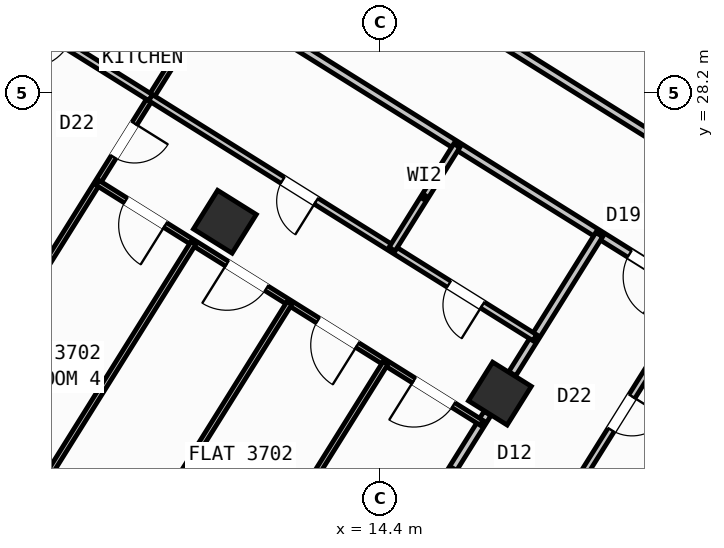
"""IFC4 building model, lengths in metres.
Left out: names, types, materials, properties, quantities, classifications, styles, units other than length and angle.
Written with IfcOpenShell. Run it as: python <this file> out.ifc"""

import sys

from ifc_helpers import new_model, si_unit, direction, frame, frame_2d, origin, origin_2d, place, context, subcontext, project, spatial, rectangle, hollow_rectangle, extrude, source, transform, mapped, element, fill, save


model = new_model("IFC4")
c1 = context("Model", 3, precision=1e-05, world=origin(), true_north=direction((0.0, 1.0)))
c2 = subcontext(c1, "Body", "Model", "MODEL_VIEW")
j1 = project(units=[si_unit("LENGTHUNIT", "METRE"), si_unit("PLANEANGLEUNIT", "RADIAN")], contexts=[c1])
p1 = place(None, origin())
s1 = spatial("IfcSite", under=j1, at=p1, CompositionType="ELEMENT")
p2 = place(p1, origin())
s2 = spatial("IfcBuilding", under=s1, at=p2, CompositionType="ELEMENT")
p3 = place(p2, frame((0.0, 0.0, 147.9)))
s3 = spatial("IfcBuildingStorey", under=s2, at=p3, CompositionType="ELEMENT", Elevation=147.9)
m1 = source(origin(), c2, "Body", "SweptSolid", [
    extrude(hollow_rectangle(XDim=0.9, YDim=0.9, WallThickness=0.036, at=origin_2d()), origin(), (0.0, 0.0, 1.0), 3.6),
])
for number, where, z_axis, x_axis in (
    (1, (16.764, 22.261, 0.0), (0.0, 0.0, 1.0), (-0.848, 0.53, 0.0)),
    (2, (11.336, 25.653, 0.0), (0.0, 0.0, 1.0), (-0.848, 0.53, 0.0)),
):
    element("IfcColumn", number, at=place(p3, frame(where, z_axis=z_axis, x_axis=x_axis)), inside=s3, PredefinedType="COLUMN", context=c2, shape_type="MappedRepresentation", body=[
        mapped(m1, transform((0.0, 0.0, 0.0), scale=1.0)),
    ])
p4 = place(p3, frame((29.268, 6.429, 0.0), z_axis=(0.0, 0.0, 1.0), x_axis=(-0.848049971435, 0.529916263149, 0.0)))
e3 = element("IfcWall", 3, at=p4, inside=s3, PredefinedType="STANDARD", context=c2, shape_type="SweptSolid", body=[
    extrude(rectangle(XDim=31.588, YDim=0.32, at=frame_2d((15.794, 0.0))), origin(), (0.0, 0.0, 1.0), 3.35),
])
p5 = place(p4, frame((16.362, 0.0, 0.0)))
e4 = element("IfcOpeningElement", 4, at=p5, cuts=e3, PredefinedType="OPENING", context=c2, shape_type="SweptSolid", body=[
    extrude(rectangle(XDim=1.2, YDim=2.15, at=frame_2d((0.6, 1.075))), frame((0.0, 0.17, 0.0), z_axis=(0.0, -1.0, 0.0), x_axis=(1.0, 0.0, 0.0)), (0.0, 0.0, 1.0), 0.34),
])
p6 = place(p4, frame((2.989, 0.0, 0.8)))
e5 = element("IfcOpeningElement", 5, at=p6, cuts=e3, PredefinedType="OPENING", context=c2, shape_type="SweptSolid", body=[
    extrude(rectangle(XDim=2.1, YDim=1.55, at=frame_2d((1.05, 0.775))), frame((0.0, 0.17, 0.0), z_axis=(0.0, -1.0, 0.0), x_axis=(1.0, 0.0, 0.0)), (0.0, 0.0, 1.0), 0.34),
])
p7 = place(p4, frame((8.359, 0.0, 0.8)))
e6 = element("IfcOpeningElement", 6, at=p7, cuts=e3, PredefinedType="OPENING", context=c2, shape_type="SweptSolid", body=[
    extrude(rectangle(XDim=2.1, YDim=1.55, at=frame_2d((1.05, 0.775))), frame((0.0, 0.17, 0.0), z_axis=(0.0, -1.0, 0.0), x_axis=(1.0, 0.0, 0.0)), (0.0, 0.0, 1.0), 0.34),
])
p8 = place(p4, frame((13.284, 0.0, 0.95)))
e7 = element("IfcOpeningElement", 7, at=p8, cuts=e3, PredefinedType="OPENING", context=c2, shape_type="SweptSolid", body=[
    extrude(rectangle(XDim=1.2, YDim=1.4, at=frame_2d((0.6, 0.7))), frame((0.0, 0.17, 0.0), z_axis=(0.0, -1.0, 0.0), x_axis=(1.0, 0.0, 0.0)), (0.0, 0.0, 1.0), 0.34),
])
p9 = place(p4, frame((29.188, 0.0, 0.95)))
e8 = element("IfcOpeningElement", 8, at=p9, cuts=e3, PredefinedType="OPENING", context=c2, shape_type="SweptSolid", body=[
    extrude(rectangle(XDim=1.2, YDim=1.4, at=frame_2d((0.6, 0.7))), frame((0.0, 0.17, 0.0), z_axis=(0.0, -1.0, 0.0), x_axis=(1.0, 0.0, 0.0)), (0.0, 0.0, 1.0), 0.34),
])
p10 = place(p4, frame((19.674, 0.0, 1.0)))
e9 = element("IfcOpeningElement", 9, at=p10, cuts=e3, PredefinedType="OPENING", context=c2, shape_type="SweptSolid", body=[
    extrude(rectangle(XDim=0.9, YDim=1.25, at=frame_2d((0.45, 0.625))), frame((0.0, 0.17, 0.0), z_axis=(0.0, -1.0, 0.0), x_axis=(1.0, 0.0, 0.0)), (0.0, 0.0, 1.0), 0.34),
])
p11 = place(p4, frame((21.896, 0.0, 1.0)))
e10 = element("IfcOpeningElement", 10, at=p11, cuts=e3, PredefinedType="OPENING", context=c2, shape_type="SweptSolid", body=[
    extrude(rectangle(XDim=0.9, YDim=1.25, at=frame_2d((0.45, 0.625))), frame((0.0, 0.17, 0.0), z_axis=(0.0, -1.0, 0.0), x_axis=(1.0, 0.0, 0.0)), (0.0, 0.0, 1.0), 0.34),
])
p12 = place(p4, frame((24.106, 0.0, 1.0)))
e11 = element("IfcOpeningElement", 11, at=p12, cuts=e3, PredefinedType="OPENING", context=c2, shape_type="SweptSolid", body=[
    extrude(rectangle(XDim=0.65, YDim=1.15, at=frame_2d((0.325, 0.575))), frame((0.0, 0.17, 0.0), z_axis=(0.0, -1.0, 0.0), x_axis=(1.0, 0.0, 0.0)), (0.0, 0.0, 1.0), 0.34),
])
p13 = place(p4, frame((26.366, 0.0, 1.0)))
e12 = element("IfcOpeningElement", 12, at=p13, cuts=e3, PredefinedType="OPENING", context=c2, shape_type="SweptSolid", body=[
    extrude(rectangle(XDim=0.9, YDim=1.25, at=frame_2d((0.45, 0.625))), frame((0.0, 0.17, 0.0), z_axis=(0.0, -1.0, 0.0), x_axis=(1.0, 0.0, 0.0)), (0.0, 0.0, 1.0), 0.34),
])
p14 = place(p3, frame((2.415, 23.452, 0.0), z_axis=(0.0, 0.0, 1.0), x_axis=(0.52991049553, 0.848053575387, 0.0)))
e13 = element("IfcWall", 13, at=p14, inside=s3, PredefinedType="STANDARD", context=c2, shape_type="SweptSolid", body=[
    extrude(rectangle(XDim=21.587, YDim=0.32, at=frame_2d((10.794, 0.0))), origin(), (0.0, 0.0, 1.0), 2.775),
])
p15 = place(p14, frame((2.356, 0.0, 0.8)))
e14 = element("IfcOpeningElement", 14, at=p15, cuts=e13, PredefinedType="OPENING", context=c2, shape_type="SweptSolid", body=[
    extrude(rectangle(XDim=2.1, YDim=1.55, at=frame_2d((1.05, 0.775))), frame((0.0, 0.17, 0.0), z_axis=(0.0, -1.0, 0.0), x_axis=(1.0, 0.0, 0.0)), (0.0, 0.0, 1.0), 0.34),
])
p16 = place(p14, frame((8.639, 0.0, 1.0)))
e15 = element("IfcOpeningElement", 15, at=p16, cuts=e13, PredefinedType="OPENING", context=c2, shape_type="SweptSolid", body=[
    extrude(rectangle(XDim=0.9, YDim=1.25, at=frame_2d((0.45, 0.625))), frame((0.0, 0.17, 0.0), z_axis=(0.0, -1.0, 0.0), x_axis=(1.0, 0.0, 0.0)), (0.0, 0.0, 1.0), 0.34),
])
p17 = place(p14, frame((17.744, 0.0, 0.85)))
e16 = element("IfcOpeningElement", 16, at=p17, cuts=e13, PredefinedType="OPENING", context=c2, shape_type="SweptSolid", body=[
    extrude(rectangle(XDim=1.5, YDim=1.5, at=frame_2d((0.75, 0.75))), frame((0.0, 0.17, 0.0), z_axis=(0.0, -1.0, 0.0), x_axis=(1.0, 0.0, 0.0)), (0.0, 0.0, 1.0), 0.34),
])
p18 = place(p3, frame((14.138, 41.825, 0.0), z_axis=(0.0, 0.0, 1.0), x_axis=(0.848046498049, -0.529921821731, 0.0)))
e17 = element("IfcWall", 17, at=p18, inside=s3, PredefinedType="STANDARD", context=c2, shape_type="SweptSolid", body=[
    extrude(rectangle(XDim=31.588, YDim=0.32, at=frame_2d((15.794, 0.0))), origin(), (0.0, 0.0, 1.0), 3.35),
])
p19 = place(p18, frame((2.949, 0.0, 0.0)))
e18 = element("IfcOpeningElement", 18, at=p19, cuts=e17, PredefinedType="OPENING", context=c2, shape_type="SweptSolid", body=[
    extrude(rectangle(XDim=1.05, YDim=2.15, at=frame_2d((0.525, 1.075))), frame((0.0, 0.17, 0.0), z_axis=(0.0, -1.0, 0.0), x_axis=(1.0, 0.0, 0.0)), (0.0, 0.0, 1.0), 0.34),
])
p20 = place(p18, frame((0.861, 0.0, 0.85)))
e19 = element("IfcOpeningElement", 19, at=p20, cuts=e17, PredefinedType="OPENING", context=c2, shape_type="SweptSolid", body=[
    extrude(rectangle(XDim=1.5, YDim=1.5, at=frame_2d((0.75, 0.75))), frame((0.0, 0.17, 0.0), z_axis=(0.0, -1.0, 0.0), x_axis=(1.0, 0.0, 0.0)), (0.0, 0.0, 1.0), 0.34),
])
p21 = place(p18, frame((8.494, 0.0, 0.85)))
e20 = element("IfcOpeningElement", 20, at=p21, cuts=e17, PredefinedType="OPENING", context=c2, shape_type="SweptSolid", body=[
    extrude(rectangle(XDim=1.8, YDim=1.5, at=frame_2d((0.9, 0.75))), frame((0.0, 0.17, 0.0), z_axis=(0.0, -1.0, 0.0), x_axis=(1.0, 0.0, 0.0)), (0.0, 0.0, 1.0), 0.34),
])
p22 = place(p18, frame((13.874, 0.0, 0.85)))
e21 = element("IfcOpeningElement", 21, at=p22, cuts=e17, PredefinedType="OPENING", context=c2, shape_type="SweptSolid", body=[
    extrude(rectangle(XDim=1.5, YDim=1.5, at=frame_2d((0.75, 0.75))), frame((0.0, 0.17, 0.0), z_axis=(0.0, -1.0, 0.0), x_axis=(1.0, 0.0, 0.0)), (0.0, 0.0, 1.0), 0.34),
])
p23 = place(p18, frame((17.104, 0.0, 1.0)))
e22 = element("IfcOpeningElement", 22, at=p23, cuts=e17, PredefinedType="OPENING", context=c2, shape_type="SweptSolid", body=[
    extrude(rectangle(XDim=0.9, YDim=1.25, at=frame_2d((0.45, 0.625))), frame((0.0, 0.17, 0.0), z_axis=(0.0, -1.0, 0.0), x_axis=(1.0, 0.0, 0.0)), (0.0, 0.0, 1.0), 0.34),
])
p24 = place(p18, frame((22.144, 0.0, 1.0)))
e23 = element("IfcOpeningElement", 23, at=p24, cuts=e17, PredefinedType="OPENING", context=c2, shape_type="SweptSolid", body=[
    extrude(rectangle(XDim=0.9, YDim=1.25, at=frame_2d((0.45, 0.625))), frame((0.0, 0.17, 0.0), z_axis=(0.0, -1.0, 0.0), x_axis=(1.0, 0.0, 0.0)), (0.0, 0.0, 1.0), 0.34),
])
p25 = place(p18, frame((27.744, 0.0, 1.0)))
e24 = element("IfcOpeningElement", 24, at=p25, cuts=e17, PredefinedType="OPENING", context=c2, shape_type="SweptSolid", body=[
    extrude(rectangle(XDim=0.9, YDim=1.25, at=frame_2d((0.45, 0.625))), frame((0.0, 0.17, 0.0), z_axis=(0.0, -1.0, 0.0), x_axis=(1.0, 0.0, 0.0)), (0.0, 0.0, 1.0), 0.34),
])
p26 = place(p3, frame((21.938, 23.391, 0.0), z_axis=(0.0, 0.0, 1.0), x_axis=(-0.529924725692, -0.848044683434, 0.0)))
e25 = element("IfcWall", 25, at=p26, inside=s3, PredefinedType="PARTITIONING", context=c2, shape_type="SweptSolid", body=[
    extrude(rectangle(XDim=10.35, YDim=0.16, at=frame_2d((5.175, 0.0))), origin(), (0.0, 0.0, 1.0), 3.34),
])
p27 = place(p3, frame((23.104, 25.256, 0.0), z_axis=(0.0, 0.0, 1.0), x_axis=(-0.848041752158, 0.529929416617, 0.0)))
e26 = element("IfcWall", 26, at=p27, inside=s3, PredefinedType="PARTITIONING", context=c2, shape_type="SweptSolid", body=[
    extrude(rectangle(XDim=16.73, YDim=0.16, at=frame_2d((8.365, 0.0))), origin(), (0.0, 0.0, 1.0), 3.34),
])
p28 = place(p27, frame((2.22, 0.0, 0.0)))
e27 = element("IfcOpeningElement", 27, at=p28, cuts=e26, PredefinedType="OPENING", context=c2, shape_type="SweptSolid", body=[
    extrude(rectangle(XDim=0.86, YDim=2.05, at=frame_2d((0.43, 1.025))), frame((0.0, 0.09, 0.0), z_axis=(0.0, -1.0, 0.0), x_axis=(1.0, 0.0, 0.0)), (0.0, 0.0, 1.0), 0.18),
])
p29 = place(p27, frame((12.084, 0.0, 0.0)))
e28 = element("IfcOpeningElement", 28, at=p29, cuts=e26, PredefinedType="OPENING", context=c2, shape_type="SweptSolid", body=[
    extrude(rectangle(XDim=1.0, YDim=2.1, at=frame_2d((0.5, 1.05))), frame((0.0, 0.09, 0.0), z_axis=(0.0, -1.0, 0.0), x_axis=(1.0, 0.0, 0.0)), (0.0, 0.0, 1.0), 0.18),
])
p30 = place(p3, frame((21.938, 23.391, 0.0), z_axis=(0.0, 0.0, 1.0), x_axis=(-0.848045850158, 0.529922858565, 0.0)))
e29 = element("IfcWall", 29, at=p30, inside=s3, PredefinedType="PARTITIONING", context=c2, shape_type="SweptSolid", body=[
    extrude(rectangle(XDim=16.73, YDim=0.16, at=frame_2d((8.365, 0.0))), origin(), (0.0, 0.0, 1.0), 3.34),
])
p31 = place(p30, frame((2.22, 0.0, 0.0)))
e30 = element("IfcOpeningElement", 30, at=p31, cuts=e29, PredefinedType="OPENING", context=c2, shape_type="SweptSolid", body=[
    extrude(rectangle(XDim=0.86, YDim=2.05, at=frame_2d((0.43, 1.025))), frame((0.0, 0.09, 0.0), z_axis=(0.0, -1.0, 0.0), x_axis=(1.0, 0.0, 0.0)), (0.0, 0.0, 1.0), 0.18),
])
p32 = place(p30, frame((14.22, 0.0, 0.0)))
e31 = element("IfcOpeningElement", 31, at=p32, cuts=e29, PredefinedType="OPENING", context=c2, shape_type="SweptSolid", body=[
    extrude(rectangle(XDim=1.0, YDim=2.1, at=frame_2d((0.5, 1.05))), frame((0.0, 0.09, 0.0), z_axis=(0.0, -1.0, 0.0), x_axis=(1.0, 0.0, 0.0)), (0.0, 0.0, 1.0), 0.18),
])
p33 = place(p3, frame((18.724, 25.399, 0.0), z_axis=(0.0, 0.0, 1.0), x_axis=(-0.529890499457, -0.848066069705, 0.0)))
e32 = element("IfcWall", 32, at=p33, inside=s3, PredefinedType="PARTITIONING", context=c2, shape_type="SweptSolid", body=[
    extrude(rectangle(XDim=3.238, YDim=0.16, at=frame_2d((1.619, 0.0))), origin(), (0.0, 0.0, 1.0), 2.775),
])
p34 = place(p3, frame((16.519, 21.87, 0.0), z_axis=(0.0, 0.0, 1.0), x_axis=(-0.529922447305, -0.848046107144, 0.0)))
e33 = element("IfcWall", 33, at=p34, inside=s3, PredefinedType="PARTITIONING", context=c2, shape_type="SweptSolid", body=[
    extrude(rectangle(XDim=5.451, YDim=0.16, at=frame_2d((2.726, 0.0))), origin(), (0.0, 0.0, 1.0), 2.775),
])
p35 = place(p3, frame((20.624, 24.212, 0.0), z_axis=(0.0, 0.0, 1.0), x_axis=(-0.529919283494, -0.848048084121, 0.0)))
e34 = element("IfcWall", 34, at=p35, inside=s3, PredefinedType="PLUMBINGWALL", context=c2, shape_type="SweptSolid", body=[
    extrude(rectangle(XDim=5.51, YDim=0.14, at=frame_2d((2.755, 0.0))), origin(), (0.0, 0.0, 1.0), 2.995),
])
p36 = place(p35, frame((2.365, 0.0, 0.0)))
e35 = element("IfcOpeningElement", 35, at=p36, cuts=e34, PredefinedType="OPENING", context=c2, shape_type="SweptSolid", body=[
    extrude(rectangle(XDim=0.78, YDim=2.05, at=frame_2d((0.39, 1.025))), frame((0.0, 0.08, 0.0), z_axis=(0.0, -1.0, 0.0), x_axis=(1.0, 0.0, 0.0)), (0.0, 0.0, 1.0), 0.16),
])
p37 = place(p3, frame((11.143, 30.136, 0.0), z_axis=(0.0, 0.0, 1.0), x_axis=(-0.529922479612, -0.848046086956, 0.0)))
e36 = element("IfcWall", 36, at=p37, inside=s3, PredefinedType="PARTITIONING", context=c2, shape_type="SweptSolid", body=[
    extrude(rectangle(XDim=10.62, YDim=0.11, at=frame_2d((5.31, 0.0))), origin(), (0.0, 0.0, 1.0), 3.34),
])
p38 = place(p37, frame((3.0, 0.0, 0.0)))
e37 = element("IfcOpeningElement", 37, at=p38, cuts=e36, PredefinedType="OPENING", context=c2, shape_type="SweptSolid", body=[
    extrude(rectangle(XDim=0.78, YDim=2.05, at=frame_2d((0.39, 1.025))), frame((0.0, 0.065, 0.0), z_axis=(0.0, -1.0, 0.0), x_axis=(1.0, 0.0, 0.0)), (0.0, 0.0, 1.0), 0.13),
])
p39 = place(p3, frame((9.871, 28.101, 0.0), z_axis=(0.0, 0.0, 1.0), x_axis=(-0.848025873403, 0.529954826413, 0.0)))
e38 = element("IfcWall", 38, at=p39, inside=s3, PredefinedType="PLUMBINGWALL", context=c2, shape_type="SweptSolid", body=[
    extrude(rectangle(XDim=3.98, YDim=0.14, at=frame_2d((1.99, 0.0))), origin(), (0.0, 0.0, 1.0), 3.34),
])
p40 = place(p39, frame((1.93, 0.0, 0.0)))
e39 = element("IfcOpeningElement", 39, at=p40, cuts=e38, PredefinedType="OPENING", context=c2, shape_type="SweptSolid", body=[
    extrude(rectangle(XDim=0.92, YDim=2.08, at=frame_2d((0.46, 1.04))), frame((0.0, 0.08, 0.0), z_axis=(0.0, -1.0, 0.0), x_axis=(1.0, 0.0, 0.0)), (0.0, 0.0, 1.0), 0.16),
])
p41 = place(p3, frame((17.452, 23.364, 0.0), z_axis=(0.0, 0.0, 1.0), x_axis=(-0.848044326704, 0.52992529657, 0.0)))
e40 = element("IfcWall", 40, at=p41, inside=s3, PredefinedType="PLUMBINGWALL", context=c2, shape_type="SweptSolid", body=[
    extrude(rectangle(XDim=8.94, YDim=0.14, at=frame_2d((4.47, 0.0))), origin(), (0.0, 0.0, 1.0), 3.34),
])
p42 = place(p41, frame((5.087, 0.0, 0.0)))
e41 = element("IfcOpeningElement", 41, at=p42, cuts=e40, PredefinedType="OPENING", context=c2, shape_type="SweptSolid", body=[
    extrude(rectangle(XDim=0.78, YDim=2.05, at=frame_2d((0.39, 1.025))), frame((0.0, 0.08, 0.0), z_axis=(0.0, -1.0, 0.0), x_axis=(1.0, 0.0, 0.0)), (0.0, 0.0, 1.0), 0.16),
])
p43 = place(p41, frame((1.218, 0.0, 0.0)))
e42 = element("IfcOpeningElement", 42, at=p43, cuts=e40, PredefinedType="OPENING", context=c2, shape_type="SweptSolid", body=[
    extrude(rectangle(XDim=0.78, YDim=2.05, at=frame_2d((0.39, 1.025))), frame((0.0, 0.08, 0.0), z_axis=(0.0, -1.0, 0.0), x_axis=(1.0, 0.0, 0.0)), (0.0, 0.0, 1.0), 0.16),
])
p44 = place(p3, frame((15.913, 27.156, 0.0), z_axis=(0.0, 0.0, 1.0), x_axis=(-0.529935194983, -0.848038141311, 0.0)))
e43 = element("IfcWall", 43, at=p44, inside=s3, PredefinedType="PLUMBINGWALL", context=c2, shape_type="SweptSolid", body=[
    extrude(rectangle(XDim=2.41, YDim=0.14, at=frame_2d((1.205, 0.0))), origin(), (0.0, 0.0, 1.0), 3.34),
])
p45 = place(p3, frame((16.403, 21.685, 0.0), z_axis=(0.0, 0.0, 1.0), x_axis=(-0.848044326704, 0.52992529657, 0.0)))
e44 = element("IfcWall", 44, at=p45, inside=s3, PredefinedType="PARTITIONING", context=c2, shape_type="SweptSolid", body=[
    extrude(rectangle(XDim=8.94, YDim=0.11, at=frame_2d((4.47, 0.0))), origin(), (0.0, 0.0, 1.0), 3.34),
])
p46 = place(p45, frame((0.657, 0.0, 0.0)))
e45 = element("IfcOpeningElement", 45, at=p46, cuts=e44, PredefinedType="OPENING", context=c2, shape_type="SweptSolid", body=[
    extrude(rectangle(XDim=0.92, YDim=2.08, at=frame_2d((0.46, 1.04))), frame((0.0, 0.065, 0.0), z_axis=(0.0, -1.0, 0.0), x_axis=(1.0, 0.0, 0.0)), (0.0, 0.0, 1.0), 0.13),
])
p47 = place(p45, frame((2.893, 0.0, 0.0)))
e46 = element("IfcOpeningElement", 46, at=p47, cuts=e44, PredefinedType="OPENING", context=c2, shape_type="SweptSolid", body=[
    extrude(rectangle(XDim=0.92, YDim=2.08, at=frame_2d((0.46, 1.04))), frame((0.0, 0.065, 0.0), z_axis=(0.0, -1.0, 0.0), x_axis=(1.0, 0.0, 0.0)), (0.0, 0.0, 1.0), 0.13),
])
p48 = place(p45, frame((5.008, 0.0, 0.0)))
e47 = element("IfcOpeningElement", 47, at=p48, cuts=e44, PredefinedType="OPENING", context=c2, shape_type="SweptSolid", body=[
    extrude(rectangle(XDim=0.92, YDim=2.08, at=frame_2d((0.46, 1.04))), frame((0.0, 0.065, 0.0), z_axis=(0.0, -1.0, 0.0), x_axis=(1.0, 0.0, 0.0)), (0.0, 0.0, 1.0), 0.13),
])
p49 = place(p45, frame((7.363, 0.0, 0.0)))
e48 = element("IfcOpeningElement", 48, at=p49, cuts=e44, PredefinedType="OPENING", context=c2, shape_type="SweptSolid", body=[
    extrude(rectangle(XDim=0.92, YDim=2.08, at=frame_2d((0.46, 1.04))), frame((0.0, 0.065, 0.0), z_axis=(0.0, -1.0, 0.0), x_axis=(1.0, 0.0, 0.0)), (0.0, 0.0, 1.0), 0.13),
])
for number, where, z_axis, x_axis in (
    (49, (14.508, 22.869, 0.0), (0.0, 0.0, 1.0), (-0.53, -0.848, 0.0)),
    (50, (12.613, 24.053, 0.0), (0.0, 0.0, 1.0), (-0.53, -0.848, 0.0)),
):
    element("IfcWall", number, at=place(p3, frame(where, z_axis=z_axis, x_axis=x_axis)), inside=s3, PredefinedType="PARTITIONING", context=c2, shape_type="SweptSolid", body=[
        extrude(rectangle(XDim=6.24, YDim=0.11, at=frame_2d((3.12, 0.0))), origin(), (0.0, 0.0, 1.0), 2.995),
    ])
p50 = place(p3, frame((10.717, 25.238, 0.0), z_axis=(0.0, 0.0, 1.0), x_axis=(-0.52991804857, -0.848048855786, 0.0)))
e51 = element("IfcWall", 51, at=p50, inside=s3, PredefinedType="PARTITIONING", context=c2, shape_type="SweptSolid", body=[
    extrude(rectangle(XDim=6.24, YDim=0.11, at=frame_2d((3.12, 0.0))), origin(), (0.0, 0.0, 1.0), 3.34),
])
m2 = source(origin(), c2, "Body", "SweptSolid", [
    extrude(rectangle(XDim=0.86, YDim=2.05, at=frame_2d((0.43, 1.025))), frame((0.0, 0.025, 0.0), z_axis=(0.0, -1.0, 0.0), x_axis=(1.0, 0.0, 0.0)), (0.0, 0.0, 1.0), 0.05),
])
p51 = place(p31, origin())
e52 = element("IfcDoor", 52, at=p51, inside=s3, OperationType="SINGLE_SWING_LEFT", PredefinedType="DOOR", context=c2, shape_type="MappedRepresentation", body=[
    mapped(m2, transform((0.0, 0.0, 0.0), scale=1.0)),
])
fill(e30, e52)
m3 = source(origin(), c2, "Body", "SweptSolid", [
    extrude(rectangle(XDim=0.78, YDim=2.05, at=frame_2d((0.39, 1.025))), frame((0.0, 0.025, 0.0), z_axis=(0.0, -1.0, 0.0), x_axis=(1.0, 0.0, 0.0)), (0.0, 0.0, 1.0), 0.05),
])
p52 = place(p36, origin())
e53 = element("IfcDoor", 53, at=p52, inside=s3, OperationType="SINGLE_SWING_LEFT", PredefinedType="DOOR", context=c2, shape_type="MappedRepresentation", body=[
    mapped(m3, transform((0.0, 0.0, 0.0), scale=1.0)),
])
fill(e35, e53)
p53 = place(p38, origin())
e54 = element("IfcDoor", 54, at=p53, inside=s3, OperationType="SINGLE_SWING_LEFT", PredefinedType="DOOR", context=c2, shape_type="MappedRepresentation", body=[
    mapped(m3, transform((0.0, 0.0, 0.0), scale=1.0)),
])
fill(e37, e54)
p54 = place(p42, origin())
e55 = element("IfcDoor", 55, at=p54, inside=s3, OperationType="SINGLE_SWING_LEFT", PredefinedType="DOOR", context=c2, shape_type="MappedRepresentation", body=[
    mapped(m3, transform((0.0, 0.0, 0.0), scale=1.0)),
])
fill(e41, e55)
p55 = place(p43, origin())
e56 = element("IfcDoor", 56, at=p55, inside=s3, OperationType="SINGLE_SWING_LEFT", PredefinedType="DOOR", context=c2, shape_type="MappedRepresentation", body=[
    mapped(m3, transform((0.0, 0.0, 0.0), scale=1.0)),
])
fill(e42, e56)
m4 = source(origin(), c2, "Body", "SweptSolid", [
    extrude(rectangle(XDim=0.92, YDim=2.08, at=frame_2d((0.46, 1.04))), frame((0.0, 0.025, 0.0), z_axis=(0.0, -1.0, 0.0), x_axis=(1.0, 0.0, 0.0)), (0.0, 0.0, 1.0), 0.05),
])
p56 = place(p46, origin())
e57 = element("IfcDoor", 57, at=p56, inside=s3, OperationType="SINGLE_SWING_RIGHT", PredefinedType="DOOR", context=c2, shape_type="MappedRepresentation", body=[
    mapped(m4, transform((0.0, 0.0, 0.0), scale=1.0)),
])
fill(e45, e57)
p57 = place(p47, origin())
e58 = element("IfcDoor", 58, at=p57, inside=s3, OperationType="SINGLE_SWING_LEFT", PredefinedType="DOOR", context=c2, shape_type="MappedRepresentation", body=[
    mapped(m4, transform((0.0, 0.0, 0.0), scale=1.0)),
])
fill(e46, e58)
p58 = place(p48, origin())
e59 = element("IfcDoor", 59, at=p58, inside=s3, OperationType="SINGLE_SWING_RIGHT", PredefinedType="DOOR", context=c2, shape_type="MappedRepresentation", body=[
    mapped(m4, transform((0.0, 0.0, 0.0), scale=1.0)),
])
fill(e47, e59)
p59 = place(p49, origin())
e60 = element("IfcDoor", 60, at=p59, inside=s3, OperationType="SINGLE_SWING_LEFT", PredefinedType="DOOR", context=c2, shape_type="MappedRepresentation", body=[
    mapped(m4, transform((0.0, 0.0, 0.0), scale=1.0)),
])
fill(e48, e60)
save(model, sys.argv[1])
